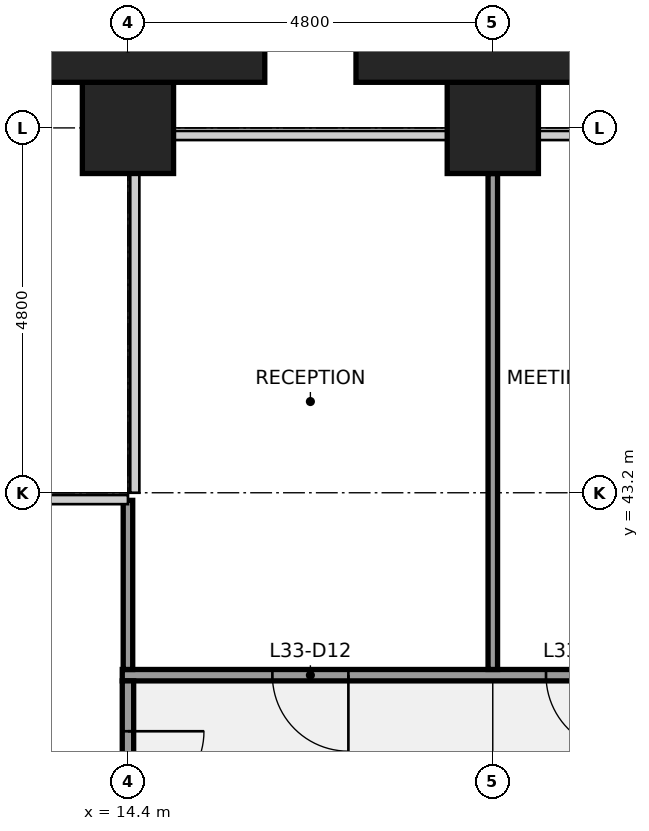
"""IFC4 building model, lengths in metres.
Left out: names, types, materials, properties, quantities, classifications, styles, units other than length and angle.
Written with IfcOpenShell. Run it as: python <this file> out.ifc"""

import sys

from ifc_helpers import new_model, si_unit, direction, frame, frame_2d, origin, origin_2d, place, context, subcontext, project, spatial, rectangle, extrude, element, fill, save


model = new_model("IFC4")
c1 = context("Model", 3, precision=1e-05, world=origin(), true_north=direction((0.0, 1.0)))
c2 = subcontext(c1, "Body", "Model", "MODEL_VIEW")
j1 = project(units=[si_unit("LENGTHUNIT", "METRE"), si_unit("PLANEANGLEUNIT", "RADIAN")], contexts=[c1])
p1 = place(None, origin())
s1 = spatial("IfcSite", under=j1, at=p1, CompositionType="ELEMENT")
p2 = place(p1, origin())
s2 = spatial("IfcBuilding", under=s1, at=p2, CompositionType="ELEMENT")
p3 = place(p2, frame((0.0, 0.0, 152.1)))
s3 = spatial("IfcBuildingStorey", under=s2, at=p3, CompositionType="ELEMENT", Elevation=152.1)
for number, where, z_axis, x_axis in (
    (1, (14.4, 48.0, 0.0), (0.0, 0.0, 1.0), (1.0, 0.0, 0.0)),
    (2, (19.2, 48.0, 0.0), (0.0, 0.0, 1.0), (1.0, 0.0, 0.0)),
):
    element("IfcColumn", number, at=place(p3, frame(where, z_axis=z_axis, x_axis=x_axis)), inside=s3, PredefinedType="COLUMN", context=c2, shape_type="SweptSolid", body=[
        extrude(rectangle(XDim=1.2, YDim=1.2, at=origin_2d()), origin(), (0.0, 0.0, 1.0), 4.0),
    ])
p4 = place(p3, frame((14.325, 40.8, 0.0), z_axis=(0.0, 0.0, 1.0), x_axis=(1.0, 0.0, 0.0)))
e3 = element("IfcWall", 3, at=p4, inside=s3, PredefinedType="PARTITIONING", context=c2, shape_type="SweptSolid", body=[
    extrude(rectangle(XDim=28.95, YDim=0.15, at=frame_2d((14.475, 0.0))), origin(), (0.0, 0.0, 1.0), 2.936),
])
p5 = place(p4, frame((1.975, 0.0, 0.0)))
e4 = element("IfcOpeningElement", 4, at=p5, cuts=e3, PredefinedType="OPENING", context=c2, shape_type="SweptSolid", body=[
    extrude(rectangle(XDim=1.0, YDim=2.1, at=frame_2d((0.5, 1.05))), frame((0.0, 0.085, 0.0), z_axis=(0.0, -1.0, 0.0), x_axis=(1.0, 0.0, 0.0)), (0.0, 0.0, 1.0), 0.17),
])
p6 = place(p4, frame((5.575, 0.0, 0.0)))
e5 = element("IfcOpeningElement", 5, at=p6, cuts=e3, PredefinedType="OPENING", context=c2, shape_type="SweptSolid", body=[
    extrude(rectangle(XDim=1.0, YDim=2.1, at=frame_2d((0.5, 1.05))), frame((0.0, 0.085, 0.0), z_axis=(0.0, -1.0, 0.0), x_axis=(1.0, 0.0, 0.0)), (0.0, 0.0, 1.0), 0.17),
])
p7 = place(p4, frame((9.175, 0.0, 0.0)))
e6 = element("IfcOpeningElement", 6, at=p7, cuts=e3, PredefinedType="OPENING", context=c2, shape_type="SweptSolid", body=[
    extrude(rectangle(XDim=1.0, YDim=2.1, at=frame_2d((0.5, 1.05))), frame((0.0, 0.085, 0.0), z_axis=(0.0, -1.0, 0.0), x_axis=(1.0, 0.0, 0.0)), (0.0, 0.0, 1.0), 0.17),
])
p8 = place(p4, frame((13.975, 0.0, 0.0)))
e7 = element("IfcOpeningElement", 7, at=p8, cuts=e3, PredefinedType="OPENING", context=c2, shape_type="SweptSolid", body=[
    extrude(rectangle(XDim=1.0, YDim=2.1, at=frame_2d((0.5, 1.05))), frame((0.0, 0.085, 0.0), z_axis=(0.0, -1.0, 0.0), x_axis=(1.0, 0.0, 0.0)), (0.0, 0.0, 1.0), 0.17),
])
p9 = place(p4, frame((19.975, 0.0, 0.0)))
e8 = element("IfcOpeningElement", 8, at=p9, cuts=e3, PredefinedType="OPENING", context=c2, shape_type="SweptSolid", body=[
    extrude(rectangle(XDim=1.0, YDim=2.1, at=frame_2d((0.5, 1.05))), frame((0.0, 0.085, 0.0), z_axis=(0.0, -1.0, 0.0), x_axis=(1.0, 0.0, 0.0)), (0.0, 0.0, 1.0), 0.17),
])
p10 = place(p4, frame((25.975, 0.0, 0.0)))
e9 = element("IfcOpeningElement", 9, at=p10, cuts=e3, PredefinedType="OPENING", context=c2, shape_type="SweptSolid", body=[
    extrude(rectangle(XDim=1.0, YDim=2.1, at=frame_2d((0.5, 1.05))), frame((0.0, 0.085, 0.0), z_axis=(0.0, -1.0, 0.0), x_axis=(1.0, 0.0, 0.0)), (0.0, 0.0, 1.0), 0.17),
])
p11 = place(p3, frame((14.4, 40.875, 0.0), z_axis=(0.0, 0.0, 1.0), x_axis=(0.0, 1.0, 0.0)))
e10 = element("IfcWall", 10, at=p11, inside=s3, PredefinedType="PARTITIONING", context=c2, shape_type="SweptSolid", body=[
    extrude(rectangle(XDim=2.225, YDim=0.125, at=frame_2d((1.113, 0.0))), origin(), (0.0, 0.0, 1.0), 2.936),
])
p12 = place(p3, frame((14.4, 38.4, 0.0), z_axis=(0.0, 0.0, 1.0), x_axis=(0.0, 1.0, 0.0)))
e11 = element("IfcWall", 11, at=p12, inside=s3, PredefinedType="PARTITIONING", context=c2, shape_type="SweptSolid", body=[
    extrude(rectangle(XDim=2.325, YDim=0.15, at=frame_2d((1.163, 0.0))), origin(), (0.0, 0.0, 1.0), 2.936),
])
p13 = place(p12, frame((0.663, 0.0, 0.0)))
e12 = element("IfcOpeningElement", 12, at=p13, cuts=e11, PredefinedType="OPENING", context=c2, shape_type="SweptSolid", body=[
    extrude(rectangle(XDim=1.0, YDim=2.1, at=frame_2d((0.5, 1.05))), frame((0.0, 0.085, 0.0), z_axis=(0.0, -1.0, 0.0), x_axis=(1.0, 0.0, 0.0)), (0.0, 0.0, 1.0), 0.17),
])
p14 = place(p3, frame((19.2, 40.875, 0.0), z_axis=(0.0, 0.0, 1.0), x_axis=(0.0, 1.0, 0.0)))
e13 = element("IfcWall", 13, at=p14, inside=s3, PredefinedType="PARTITIONING", context=c2, shape_type="SweptSolid", body=[
    extrude(rectangle(XDim=6.525, YDim=0.125, at=frame_2d((3.262, 0.0))), origin(), (0.0, 0.0, 1.0), 2.936),
])
for number, where, z_axis, x_axis in (
    (14, (14.4, 49.05, 0.0), (0.0, 0.0, 1.0), (1.0, 0.0, 0.0)),
    (15, (19.2, 49.05, 0.0), (0.0, 0.0, 1.0), (1.0, 0.0, 0.0)),
):
    element("IfcColumn", number, at=place(p3, frame(where, z_axis=z_axis, x_axis=x_axis)), inside=s3, PredefinedType="PILASTER", context=c2, shape_type="SweptSolid", body=[
        extrude(rectangle(XDim=3.6, YDim=0.9, at=origin_2d()), origin(), (0.0, 0.0, 1.0), 4.0),
    ])
p15 = place(p5, origin())
e16 = element("IfcDoor", 16, at=p15, inside=s3, OperationType="SINGLE_SWING_RIGHT", PredefinedType="DOOR", context=c2, shape_type="SweptSolid", body=[
    extrude(rectangle(XDim=1.0, YDim=2.1, at=frame_2d((0.5, 1.05))), frame((0.0, 0.025, 0.0), z_axis=(0.0, -1.0, 0.0), x_axis=(1.0, 0.0, 0.0)), (0.0, 0.0, 1.0), 0.05),
])
fill(e4, e16)
p16 = place(p6, origin())
e17 = element("IfcDoor", 17, at=p16, inside=s3, OperationType="SINGLE_SWING_RIGHT", PredefinedType="DOOR", context=c2, shape_type="SweptSolid", body=[
    extrude(rectangle(XDim=1.0, YDim=2.1, at=frame_2d((0.5, 1.05))), frame((0.0, 0.025, 0.0), z_axis=(0.0, -1.0, 0.0), x_axis=(1.0, 0.0, 0.0)), (0.0, 0.0, 1.0), 0.05),
])
fill(e5, e17)
p17 = place(p13, origin())
e18 = element("IfcDoor", 18, at=p17, inside=s3, OperationType="SINGLE_SWING_RIGHT", PredefinedType="DOOR", context=c2, shape_type="SweptSolid", body=[
    extrude(rectangle(XDim=1.0, YDim=2.1, at=frame_2d((0.5, 1.05))), frame((0.0, 0.025, 0.0), z_axis=(0.0, -1.0, 0.0), x_axis=(1.0, 0.0, 0.0)), (0.0, 0.0, 1.0), 0.05),
])
fill(e12, e18)
save(model, sys.argv[1])
